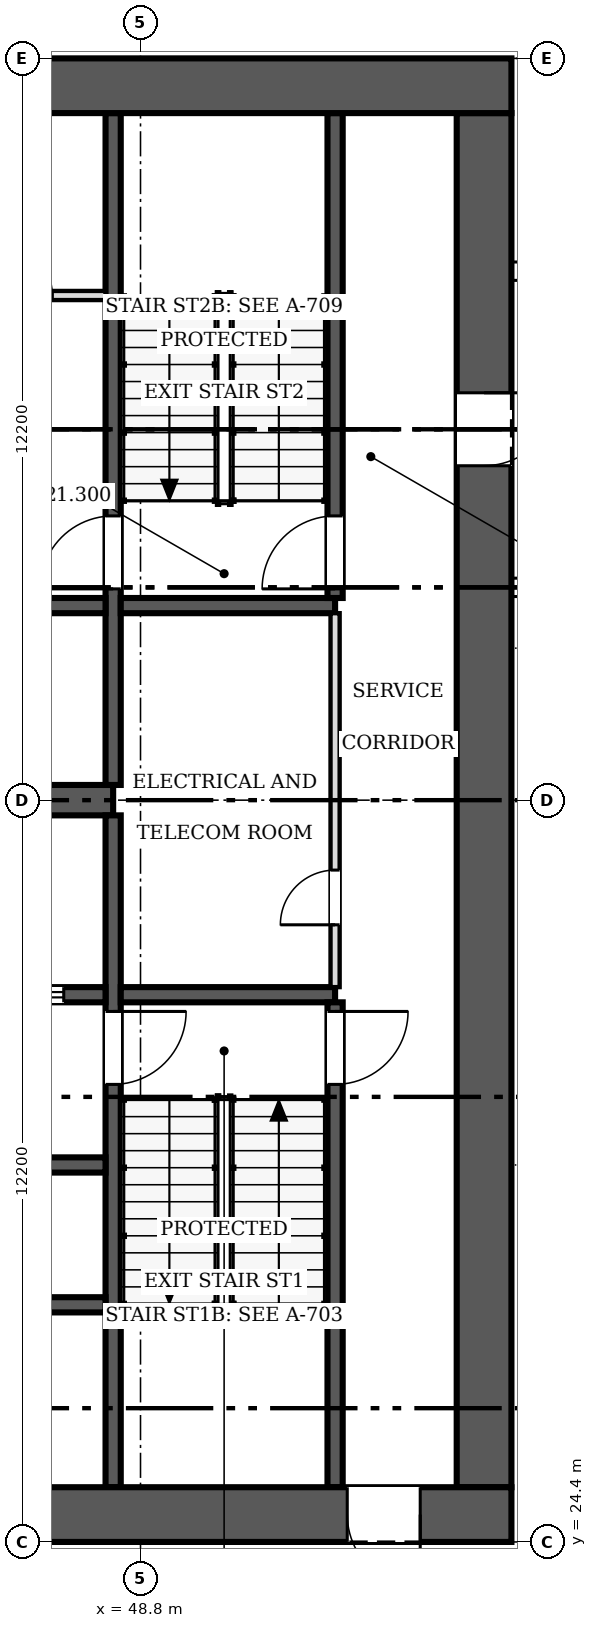
"""IFC4 building model, lengths in metres.
Left out: names, types, materials, properties, quantities, classifications, styles, units other than length and angle.
Written with IfcOpenShell. Run it as: python <this file> out.ifc"""

import sys

from ifc_helpers import new_model, si_unit, direction, frame, frame_2d, origin, place, context, subcontext, project, spatial, rectangle, extrude, source, transform, mapped, element, fill, save


model = new_model("IFC4")
c1 = context("Model", 3, precision=1e-05, world=origin(), true_north=direction((0.0, 1.0)))
c2 = subcontext(c1, "Body", "Model", "MODEL_VIEW")
j1 = project(units=[si_unit("LENGTHUNIT", "METRE"), si_unit("PLANEANGLEUNIT", "RADIAN")], contexts=[c1])
p1 = place(None, origin())
s1 = spatial("IfcSite", under=j1, at=p1, CompositionType="ELEMENT")
p2 = place(p1, origin())
s2 = spatial("IfcBuilding", under=s1, at=p2, CompositionType="ELEMENT")
p3 = place(p2, frame((0.0, 0.0, 21.3)))
s3 = spatial("IfcBuildingStorey", under=s2, at=p3, CompositionType="ELEMENT", Elevation=21.3)
p4 = place(p3, frame((54.9, 24.85, 0.0), z_axis=(0.0, 0.0, 1.0), x_axis=(-1.0, 0.0, 0.0)))
e1 = element("IfcWall", 1, at=p4, inside=s3, PredefinedType="SHEAR", context=c2, shape_type="SweptSolid", body=[
    extrude(rectangle(XDim=24.4, YDim=0.9, at=frame_2d((12.2, 0.0))), origin(), (0.0, 0.0, 1.0), 4.5),
])
m1 = source(origin(), c2, "Body", "SweptSolid", [
    extrude(rectangle(XDim=1.2, YDim=2.1, at=frame_2d((0.6, 1.05))), frame((0.0, 0.46, 0.0), z_axis=(0.0, -1.0, 0.0), x_axis=(1.0, 0.0, 0.0)), (0.0, 0.0, 1.0), 0.92),
])
p5 = place(p4, frame((1.5, 0.0, 0.0)))
e2 = element("IfcOpeningElement", 2, at=p5, cuts=e1, PredefinedType="OPENING", context=c2, shape_type="MappedRepresentation", body=[
    mapped(m1, transform((0.0, 0.0, 0.0), scale=1.0)),
])
p6 = place(p3, frame((30.5, 48.35, 0.0), z_axis=(0.0, 0.0, 1.0), x_axis=(1.0, 0.0, 0.0)))
e3 = element("IfcWall", 3, at=p6, inside=s3, PredefinedType="SHEAR", context=c2, shape_type="SweptSolid", body=[
    extrude(rectangle(XDim=24.4, YDim=0.9, at=frame_2d((12.2, 0.0))), origin(), (0.0, 0.0, 1.0), 4.5),
])
p7 = place(p3, frame((54.45, 47.9, 0.0), z_axis=(0.0, 0.0, 1.0), x_axis=(0.0, -1.0, 0.0)))
e4 = element("IfcWall", 4, at=p7, inside=s3, PredefinedType="SHEAR", context=c2, shape_type="SweptSolid", body=[
    extrude(rectangle(XDim=22.6, YDim=0.9, at=frame_2d((11.3, 0.0))), origin(), (0.0, 0.0, 1.0), 4.5),
])
p8 = place(p7, frame((4.6, 0.0, 0.0)))
e5 = element("IfcOpeningElement", 5, at=p8, cuts=e4, PredefinedType="OPENING", context=c2, shape_type="MappedRepresentation", body=[
    mapped(m1, transform((0.0, 0.0, 0.0), scale=1.0)),
])
p9 = place(p3, frame((31.4, 36.6, 0.0), z_axis=(0.0, 0.0, 1.0), x_axis=(1.0, 0.0, 0.0)))
e6 = element("IfcWall", 6, at=p9, inside=s3, PredefinedType="SHEAR", context=c2, shape_type="SweptSolid", body=[
    extrude(rectangle(XDim=16.95, YDim=0.5, at=frame_2d((8.475, 0.0))), origin(), (0.0, 0.0, 1.0), 4.5),
])
p10 = place(p3, frame((48.35, 36.35, 0.0), z_axis=(0.0, 0.0, 1.0), x_axis=(0.0, -1.0, 0.0)))
e7 = element("IfcWall", 7, at=p10, inside=s3, PredefinedType="SOLIDWALL", context=c2, shape_type="SweptSolid", body=[
    extrude(rectangle(XDim=11.05, YDim=0.25, at=frame_2d((5.525, 0.0))), origin(), (0.0, 0.0, 1.0), 4.5),
])
m2 = source(origin(), c2, "Body", "SweptSolid", [
    extrude(rectangle(XDim=1.2, YDim=2.1, at=frame_2d((0.6, 1.05))), frame((0.0, 0.135, 0.0), z_axis=(0.0, -1.0, 0.0), x_axis=(1.0, 0.0, 0.0)), (0.0, 0.0, 1.0), 0.27),
])
p11 = place(p10, frame((3.225, 0.0, 0.0)))
e8 = element("IfcOpeningElement", 8, at=p11, cuts=e7, PredefinedType="OPENING", context=c2, shape_type="MappedRepresentation", body=[
    mapped(m2, transform((0.0, 0.0, 0.0), scale=1.0)),
])
p12 = place(p3, frame((48.35, 47.9, 0.0), z_axis=(0.0, 0.0, 1.0), x_axis=(0.0, -1.0, 0.0)))
e9 = element("IfcWall", 9, at=p12, inside=s3, PredefinedType="SOLIDWALL", context=c2, shape_type="SweptSolid", body=[
    extrude(rectangle(XDim=11.05, YDim=0.25, at=frame_2d((5.525, 0.0))), origin(), (0.0, 0.0, 1.0), 4.5),
])
p13 = place(p12, frame((6.625, 0.0, 0.0)))
e10 = element("IfcOpeningElement", 10, at=p13, cuts=e9, PredefinedType="OPENING", context=c2, shape_type="MappedRepresentation", body=[
    mapped(m2, transform((0.0, 0.0, 0.0), scale=1.0)),
])
p14 = place(p3, frame((48.225, 33.4, 0.0), z_axis=(0.0, 0.0, 1.0), x_axis=(-1.0, 0.0, 0.0)))
e11 = element("IfcWall", 11, at=p14, inside=s3, PredefinedType="SOLIDWALL", context=c2, shape_type="SweptSolid", body=[
    extrude(rectangle(XDim=5.275, YDim=0.25, at=frame_2d((2.638, 0.0))), origin(), (0.0, 0.0, 1.0), 4.5),
])
p15 = place(p14, frame((3.512, 0.0, 0.0)))
e12 = element("IfcOpeningElement", 12, at=p15, cuts=e11, PredefinedType="OPENING", context=c2, shape_type="MappedRepresentation", body=[
    mapped(m2, transform((0.0, 0.0, 0.0), scale=1.0)),
])
p16 = place(p14, frame((0.688, 0.0, 0.0)))
e13 = element("IfcOpeningElement", 13, at=p16, cuts=e11, PredefinedType="OPENING", context=c2, shape_type="MappedRepresentation", body=[
    mapped(m2, transform((0.0, 0.0, 0.0), scale=1.0)),
])
p17 = place(p3, frame((48.475, 33.4, 0.0), z_axis=(0.0, 0.0, 1.0), x_axis=(1.0, 0.0, 0.0)))
e14 = element("IfcWall", 14, at=p17, inside=s3, PredefinedType="SOLIDWALL", context=c2, shape_type="SweptSolid", body=[
    extrude(rectangle(XDim=3.525, YDim=0.25, at=frame_2d((1.762, 0.0))), origin(), (0.0, 0.0, 1.0), 4.5),
])
for number, where, z_axis, x_axis in (
    (15, (42.95, 28.3, 0.0), (0.0, 0.0, 1.0), (1.0, 0.0, 0.0)),
    (16, (42.95, 39.8, 0.0), (0.0, 0.0, 1.0), (1.0, 0.0, 0.0)),
):
    element("IfcWall", number, at=place(p3, frame(where, z_axis=z_axis, x_axis=x_axis)), inside=s3, PredefinedType="SOLIDWALL", context=c2, shape_type="SweptSolid", body=[
        extrude(rectangle(XDim=5.275, YDim=0.25, at=frame_2d((2.638, 0.0))), origin(), (0.0, 0.0, 1.0), 4.5),
    ])
p18 = place(p3, frame((48.475, 39.8, 0.0), z_axis=(0.0, 0.0, 1.0), x_axis=(1.0, 0.0, 0.0)))
e17 = element("IfcWall", 17, at=p18, inside=s3, PredefinedType="SOLIDWALL", context=c2, shape_type="SweptSolid", body=[
    extrude(rectangle(XDim=3.525, YDim=0.25, at=frame_2d((1.762, 0.0))), origin(), (0.0, 0.0, 1.0), 4.5),
])
p19 = place(p3, frame((52.0, 25.3, 0.0), z_axis=(0.0, 0.0, 1.0), x_axis=(0.0, 1.0, 0.0)))
e18 = element("IfcWall", 18, at=p19, inside=s3, PredefinedType="SOLIDWALL", context=c2, shape_type="SweptSolid", body=[
    extrude(rectangle(XDim=7.975, YDim=0.25, at=frame_2d((3.987, 0.0))), origin(), (0.0, 0.0, 1.0), 4.5),
])
p20 = place(p19, frame((6.625, 0.0, 0.0)))
e19 = element("IfcOpeningElement", 19, at=p20, cuts=e18, PredefinedType="OPENING", context=c2, shape_type="MappedRepresentation", body=[
    mapped(m2, transform((0.0, 0.0, 0.0), scale=1.0)),
])
p21 = place(p3, frame((52.0, 39.925, 0.0), z_axis=(0.0, 0.0, 1.0), x_axis=(0.0, 1.0, 0.0)))
e20 = element("IfcWall", 20, at=p21, inside=s3, PredefinedType="SOLIDWALL", context=c2, shape_type="SweptSolid", body=[
    extrude(rectangle(XDim=7.975, YDim=0.25, at=frame_2d((3.987, 0.0))), origin(), (0.0, 0.0, 1.0), 4.5),
])
p22 = place(p21, frame((0.15, 0.0, 0.0)))
e21 = element("IfcOpeningElement", 21, at=p22, cuts=e20, PredefinedType="OPENING", context=c2, shape_type="MappedRepresentation", body=[
    mapped(m2, transform((0.0, 0.0, 0.0), scale=1.0)),
])
p23 = place(p3, frame((42.95, 30.6, 0.0), z_axis=(0.0, 0.0, 1.0), x_axis=(1.0, 0.0, 0.0)))
e22 = element("IfcWall", 22, at=p23, inside=s3, PredefinedType="SOLIDWALL", context=c2, shape_type="SweptSolid", body=[
    extrude(rectangle(XDim=5.275, YDim=0.25, at=frame_2d((2.638, 0.0))), origin(), (0.0, 0.0, 1.0), 4.5),
])
p24 = place(p3, frame((52.0, 33.525, 0.0), z_axis=(0.0, 0.0, 1.0), x_axis=(0.0, 1.0, 0.0)))
e23 = element("IfcWall", 23, at=p24, inside=s3, PredefinedType="PARTITIONING", context=c2, shape_type="SweptSolid", body=[
    extrude(rectangle(XDim=6.15, YDim=0.15, at=frame_2d((3.075, 0.0))), origin(), (0.0, 0.0, 1.0), 4.3),
])
m3 = source(origin(), c2, "Body", "SweptSolid", [
    extrude(rectangle(XDim=0.9, YDim=2.1, at=frame_2d((0.45, 1.05))), frame((0.0, 0.085, 0.0), z_axis=(0.0, -1.0, 0.0), x_axis=(1.0, 0.0, 0.0)), (0.0, 0.0, 1.0), 0.17),
])
p25 = place(p24, frame((1.025, 0.0, 0.0)))
e24 = element("IfcOpeningElement", 24, at=p25, cuts=e23, PredefinedType="OPENING", context=c2, shape_type="MappedRepresentation", body=[
    mapped(m3, transform((0.0, 0.0, 0.0), scale=1.0)),
])
p26 = place(p3, frame((45.65, 44.9, 0.0), z_axis=(0.0, 0.0, 1.0), x_axis=(1.0, 0.0, 0.0)))
e25 = element("IfcWall", 25, at=p26, inside=s3, PredefinedType="PARTITIONING", context=c2, shape_type="SweptSolid", body=[
    extrude(rectangle(XDim=2.575, YDim=0.15, at=frame_2d((1.288, 0.0))), origin(), (0.0, 0.0, 1.0), 4.3),
])
p27 = place(p26, frame((0.8, 0.0, 0.0)))
e26 = element("IfcOpeningElement", 26, at=p27, cuts=e25, PredefinedType="OPENING", context=c2, shape_type="MappedRepresentation", body=[
    mapped(m3, transform((0.0, 0.0, 0.0), scale=1.0)),
])
m4 = source(origin(), c2, "Body", "SweptSolid", [
    extrude(rectangle(XDim=1.2, YDim=2.1, at=frame_2d((0.6, 1.05))), frame((0.0, 0.025, 0.0), z_axis=(0.0, -1.0, 0.0), x_axis=(1.0, 0.0, 0.0)), (0.0, 0.0, 1.0), 0.05),
])
p28 = place(p5, origin())
e27 = element("IfcDoor", 27, at=p28, inside=s3, OperationType="SINGLE_SWING_LEFT", PredefinedType="DOOR", context=c2, shape_type="MappedRepresentation", body=[
    mapped(m4, transform((0.0, 0.0, 0.0), scale=1.0)),
])
fill(e2, e27)
p29 = place(p8, origin())
e28 = element("IfcDoor", 28, at=p29, inside=s3, OperationType="SINGLE_SWING_LEFT", PredefinedType="DOOR", context=c2, shape_type="MappedRepresentation", body=[
    mapped(m4, transform((0.0, 0.0, 0.0), scale=1.0)),
])
fill(e5, e28)
p30 = place(p11, origin())
e29 = element("IfcDoor", 29, at=p30, inside=s3, OperationType="SINGLE_SWING_LEFT", PredefinedType="DOOR", context=c2, shape_type="MappedRepresentation", body=[
    mapped(m4, transform((0.0, 0.0, 0.0), scale=1.0)),
])
fill(e8, e29)
p31 = place(p13, origin())
e30 = element("IfcDoor", 30, at=p31, inside=s3, OperationType="SINGLE_SWING_RIGHT", PredefinedType="DOOR", context=c2, shape_type="MappedRepresentation", body=[
    mapped(m4, transform((0.0, 0.0, 0.0), scale=1.0)),
])
fill(e10, e30)
p32 = place(p16, origin())
e31 = element("IfcDoor", 31, at=p32, inside=s3, OperationType="DOUBLE_DOOR_SLIDING", PredefinedType="DOOR", context=c2, shape_type="MappedRepresentation", body=[
    mapped(m4, transform((0.0, 0.0, 0.0), scale=1.0)),
])
fill(e13, e31)
p33 = place(p20, origin())
e32 = element("IfcDoor", 32, at=p33, inside=s3, OperationType="SINGLE_SWING_RIGHT", PredefinedType="DOOR", context=c2, shape_type="MappedRepresentation", body=[
    mapped(m4, transform((0.0, 0.0, 0.0), scale=1.0)),
])
fill(e19, e32)
p34 = place(p22, origin())
e33 = element("IfcDoor", 33, at=p34, inside=s3, OperationType="SINGLE_SWING_LEFT", PredefinedType="DOOR", context=c2, shape_type="MappedRepresentation", body=[
    mapped(m4, transform((0.0, 0.0, 0.0), scale=1.0)),
])
fill(e21, e33)
m5 = source(origin(), c2, "Body", "SweptSolid", [
    extrude(rectangle(XDim=0.9, YDim=2.1, at=frame_2d((0.45, 1.05))), frame((0.0, 0.025, 0.0), z_axis=(0.0, -1.0, 0.0), x_axis=(1.0, 0.0, 0.0)), (0.0, 0.0, 1.0), 0.05),
])
p35 = place(p25, origin())
e34 = element("IfcDoor", 34, at=p35, inside=s3, OperationType="SINGLE_SWING_LEFT", PredefinedType="DOOR", context=c2, shape_type="MappedRepresentation", body=[
    mapped(m5, transform((0.0, 0.0, 0.0), scale=1.0)),
])
fill(e24, e34)
save(model, sys.argv[1])
